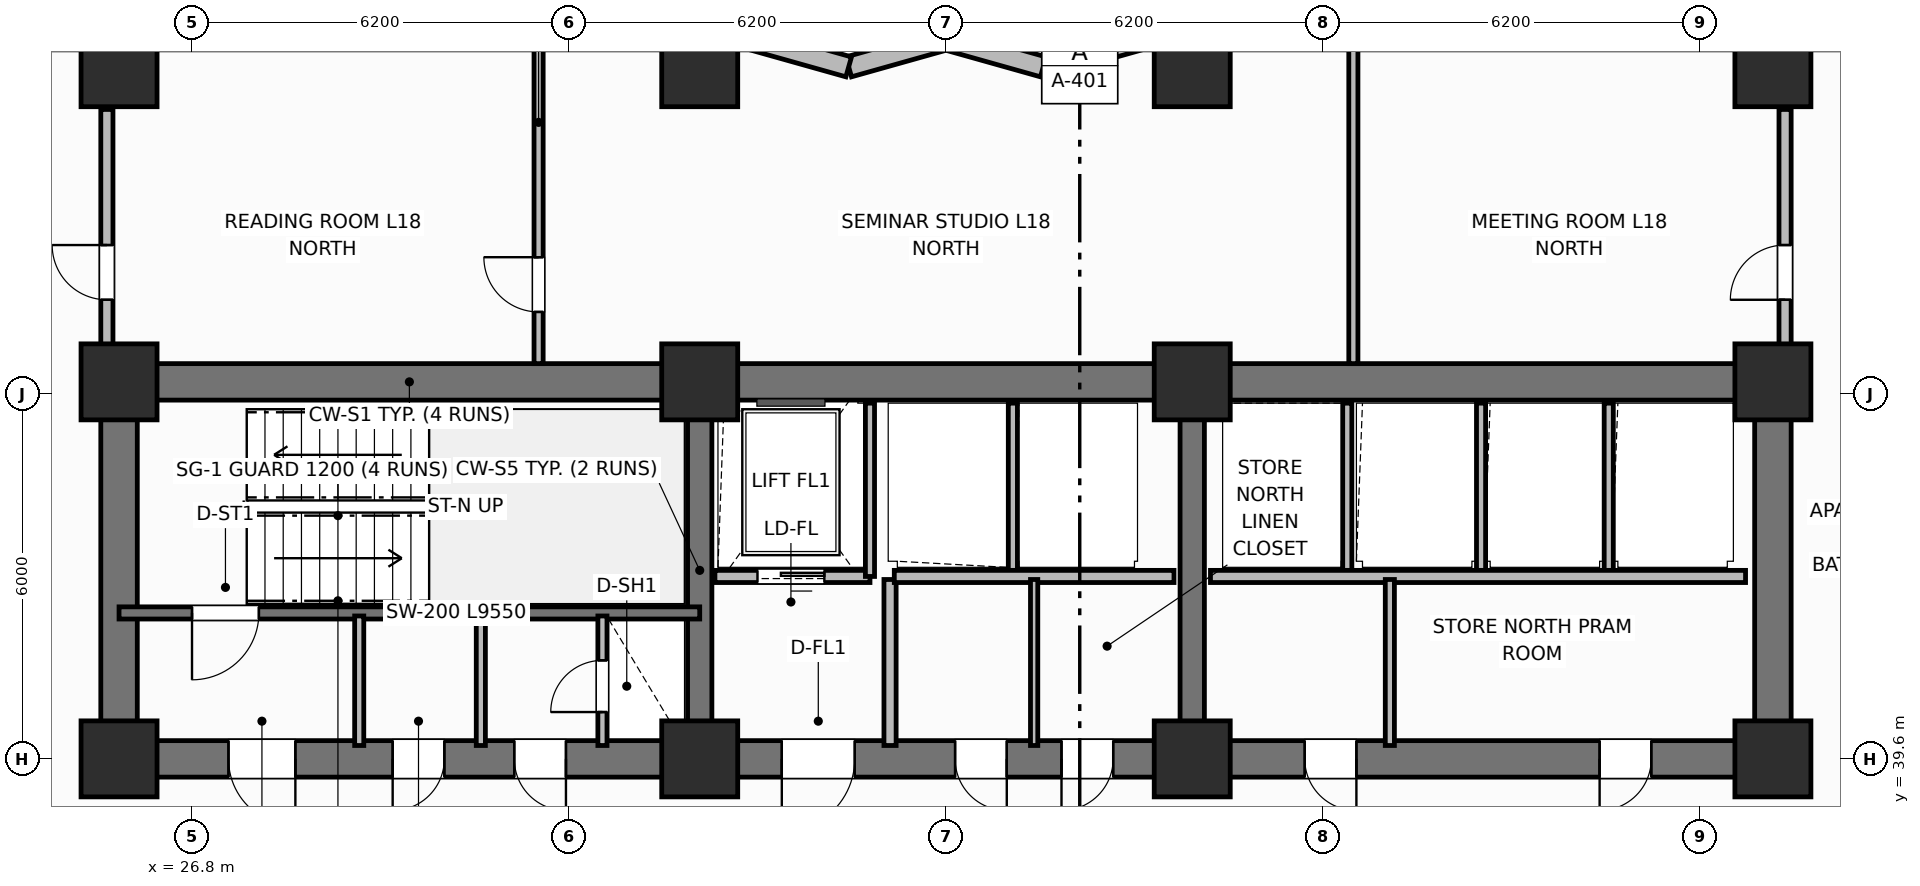
"""IFC4 building model, lengths in metres.
Left out: names, types, materials, properties, quantities, classifications, styles, units other than length and angle.
Written with IfcOpenShell. Run it as: python <this file> out.ifc"""

import sys

from ifc_helpers import new_model, si_unit, direction, frame, frame_2d, origin, origin_2d, place, context, subcontext, project, spatial, rectangle, extrude, element, fill, save


model = new_model("IFC4")
c1 = context("Model", 3, precision=1e-05, world=origin(), true_north=direction((0.0, 1.0)))
c2 = subcontext(c1, "Body", "Model", "MODEL_VIEW")
j1 = project(units=[si_unit("LENGTHUNIT", "METRE"), si_unit("PLANEANGLEUNIT", "RADIAN")], contexts=[c1])
p1 = place(None, origin())
s1 = spatial("IfcSite", under=j1, at=p1, CompositionType="ELEMENT")
p2 = place(p1, origin())
s2 = spatial("IfcBuilding", under=s1, at=p2, CompositionType="ELEMENT")
p3 = place(p2, frame((0.0, 0.0, 73.2)))
s3 = spatial("IfcBuildingStorey", under=s2, at=p3, CompositionType="ELEMENT", Elevation=73.2)
p4 = place(p3, frame((25.6, 45.8, 0.0), z_axis=(0.0, 0.0, 1.0), x_axis=(1.0, 0.0, 0.0)))
e1 = element("IfcWall", 1, at=p4, inside=s3, PredefinedType="SHEAR", context=c2, shape_type="SweptSolid", body=[
    extrude(rectangle(XDim=27.2, YDim=0.6, at=frame_2d((13.6, 0.0))), origin(), (0.0, 0.0, 1.0), 3.7),
])
for number, where, z_axis, x_axis in (
    (2, (25.6, 39.9, 0.0), (0.0, 0.0, 1.0), (0.0, 1.0, 0.0)),
    (3, (52.8, 39.9, 0.0), (0.0, 0.0, 1.0), (0.0, 1.0, 0.0)),
):
    element("IfcWall", number, at=place(p3, frame(where, z_axis=z_axis, x_axis=x_axis)), inside=s3, PredefinedType="SHEAR", context=c2, shape_type="SweptSolid", body=[
        extrude(rectangle(XDim=5.6, YDim=0.6, at=frame_2d((2.8, 0.0))), origin(), (0.0, 0.0, 1.0), 3.7),
    ])
p5 = place(p3, frame((52.8, 39.6, 0.0), z_axis=(0.0, 0.0, 1.0), x_axis=(-1.0, 0.0, 0.0)))
e4 = element("IfcWall", 4, at=p5, inside=s3, PredefinedType="SHEAR", context=c2, shape_type="SweptSolid", body=[
    extrude(rectangle(XDim=27.2, YDim=0.6, at=frame_2d((13.6, 0.0))), origin(), (0.0, 0.0, 1.0), 3.7),
])
p6 = place(p5, frame((24.3, 0.0, 0.0)))
e5 = element("IfcOpeningElement", 5, at=p6, cuts=e4, PredefinedType="OPENING", context=c2, shape_type="SweptSolid", body=[
    extrude(rectangle(XDim=1.1, YDim=2.15, at=frame_2d((0.55, 1.075))), frame((0.0, 0.31, 0.0), z_axis=(0.0, -1.0, 0.0), x_axis=(1.0, 0.0, 0.0)), (0.0, 0.0, 1.0), 0.62),
])
p7 = place(p5, frame((21.85, 0.0, 0.0)))
e6 = element("IfcOpeningElement", 6, at=p7, cuts=e4, PredefinedType="OPENING", context=c2, shape_type="SweptSolid", body=[
    extrude(rectangle(XDim=0.85, YDim=2.1, at=frame_2d((0.425, 1.05))), frame((0.0, 0.31, 0.0), z_axis=(0.0, -1.0, 0.0), x_axis=(1.0, 0.0, 0.0)), (0.0, 0.0, 1.0), 0.62),
])
p8 = place(p5, frame((19.85, 0.0, 0.0)))
e7 = element("IfcOpeningElement", 7, at=p8, cuts=e4, PredefinedType="OPENING", context=c2, shape_type="SweptSolid", body=[
    extrude(rectangle(XDim=0.85, YDim=2.1, at=frame_2d((0.425, 1.05))), frame((0.0, 0.31, 0.0), z_axis=(0.0, -1.0, 0.0), x_axis=(1.0, 0.0, 0.0)), (0.0, 0.0, 1.0), 0.62),
])
p9 = place(p5, frame((15.1, 0.0, 0.0)))
e8 = element("IfcOpeningElement", 8, at=p9, cuts=e4, PredefinedType="OPENING", context=c2, shape_type="SweptSolid", body=[
    extrude(rectangle(XDim=1.2, YDim=2.15, at=frame_2d((0.6, 1.075))), frame((0.0, 0.31, 0.0), z_axis=(0.0, -1.0, 0.0), x_axis=(1.0, 0.0, 0.0)), (0.0, 0.0, 1.0), 0.62),
])
p10 = place(p5, frame((12.6, 0.0, 0.0)))
e9 = element("IfcOpeningElement", 9, at=p10, cuts=e4, PredefinedType="OPENING", context=c2, shape_type="SweptSolid", body=[
    extrude(rectangle(XDim=0.85, YDim=2.1, at=frame_2d((0.425, 1.05))), frame((0.0, 0.31, 0.0), z_axis=(0.0, -1.0, 0.0), x_axis=(1.0, 0.0, 0.0)), (0.0, 0.0, 1.0), 0.62),
])
p11 = place(p5, frame((10.85, 0.0, 0.0)))
e10 = element("IfcOpeningElement", 10, at=p11, cuts=e4, PredefinedType="OPENING", context=c2, shape_type="SweptSolid", body=[
    extrude(rectangle(XDim=0.85, YDim=2.1, at=frame_2d((0.425, 1.05))), frame((0.0, 0.31, 0.0), z_axis=(0.0, -1.0, 0.0), x_axis=(1.0, 0.0, 0.0)), (0.0, 0.0, 1.0), 0.62),
])
p12 = place(p5, frame((6.85, 0.0, 0.0)))
e11 = element("IfcOpeningElement", 11, at=p12, cuts=e4, PredefinedType="OPENING", context=c2, shape_type="SweptSolid", body=[
    extrude(rectangle(XDim=0.85, YDim=2.1, at=frame_2d((0.425, 1.05))), frame((0.0, 0.31, 0.0), z_axis=(0.0, -1.0, 0.0), x_axis=(1.0, 0.0, 0.0)), (0.0, 0.0, 1.0), 0.62),
])
p13 = place(p5, frame((2.0, 0.0, 0.0)))
e12 = element("IfcOpeningElement", 12, at=p13, cuts=e4, PredefinedType="OPENING", context=c2, shape_type="SweptSolid", body=[
    extrude(rectangle(XDim=0.85, YDim=2.1, at=frame_2d((0.425, 1.05))), frame((0.0, 0.31, 0.0), z_axis=(0.0, -1.0, 0.0), x_axis=(1.0, 0.0, 0.0)), (0.0, 0.0, 1.0), 0.62),
])
for number, where, z_axis, x_axis in (
    (13, (35.15, 39.9, 0.0), (0.0, 0.0, 1.0), (0.0, 1.0, 0.0)),
    (14, (43.25, 39.9, 0.0), (0.0, 0.0, 1.0), (0.0, 1.0, 0.0)),
):
    element("IfcWall", number, at=place(p3, frame(where, z_axis=z_axis, x_axis=x_axis)), inside=s3, PredefinedType="SHEAR", context=c2, shape_type="SweptSolid", body=[
        extrude(rectangle(XDim=5.6, YDim=0.4, at=frame_2d((2.8, 0.0))), origin(), (0.0, 0.0, 1.0), 3.7),
    ])
for number, where, z_axis, x_axis in (
    (15, (25.6, 39.6, 0.0), (0.0, 0.0, 1.0), (1.0, 0.0, 0.0)),
    (16, (25.6, 45.8, 0.0), (0.0, 0.0, 1.0), (1.0, 0.0, 0.0)),
    (17, (35.15, 39.6, 0.0), (0.0, 0.0, 1.0), (1.0, 0.0, 0.0)),
    (18, (35.15, 45.8, 0.0), (0.0, 0.0, 1.0), (1.0, 0.0, 0.0)),
    (19, (43.25, 39.6, 0.0), (0.0, 0.0, 1.0), (1.0, 0.0, 0.0)),
    (20, (43.25, 45.8, 0.0), (0.0, 0.0, 1.0), (1.0, 0.0, 0.0)),
    (21, (52.8, 39.6, 0.0), (0.0, 0.0, 1.0), (1.0, 0.0, 0.0)),
    (22, (52.8, 45.8, 0.0), (0.0, 0.0, 1.0), (1.0, 0.0, 0.0)),
    (23, (25.6, 50.95, 0.0), (0.0, 0.0, 1.0), (1.0, 0.0, 0.0)),
    (24, (35.15, 50.95, 0.0), (0.0, 0.0, 1.0), (1.0, 0.0, 0.0)),
    (25, (43.25, 50.95, 0.0), (0.0, 0.0, 1.0), (1.0, 0.0, 0.0)),
    (26, (52.8, 50.95, 0.0), (0.0, 0.0, 1.0), (1.0, 0.0, 0.0)),
):
    element("IfcColumn", number, at=place(p3, frame(where, z_axis=z_axis, x_axis=x_axis)), inside=s3, PredefinedType="COLUMN", context=c2, shape_type="SweptSolid", body=[
        extrude(rectangle(XDim=1.25, YDim=1.25, at=origin_2d()), origin(), (0.0, 0.0, 1.0), 3.7),
    ])
p14 = place(p3, frame((42.4, 51.43, 0.0), z_axis=(0.0, 0.0, 1.0), x_axis=(-0.962652136636, -0.270741322725, 0.0)))
e27 = element("IfcWall", 27, at=p14, inside=s3, PredefinedType="SOLIDWALL", context=c2, shape_type="SweptSolid", body=[
    extrude(rectangle(XDim=1.662, YDim=0.34, at=frame_2d((0.831, 0.0))), origin(), (0.0, 0.0, 1.0), 2.66),
])
p15 = place(p3, frame((40.8, 50.98, 0.0), z_axis=(0.0, 0.0, 1.0), x_axis=(-0.962662902433, 0.270703040766, 0.0)))
e28 = element("IfcWall", 28, at=p15, inside=s3, PredefinedType="SOLIDWALL", context=c2, shape_type="SweptSolid", body=[
    extrude(rectangle(XDim=1.662, YDim=0.34, at=frame_2d((0.831, 0.0))), origin(), (0.0, 0.0, 1.0), 2.66),
])
p16 = place(p3, frame((39.2, 51.43, 0.0), z_axis=(0.0, 0.0, 1.0), x_axis=(-0.962652136636, -0.270741322725, 0.0)))
e29 = element("IfcWall", 29, at=p16, inside=s3, PredefinedType="SOLIDWALL", context=c2, shape_type="SweptSolid", body=[
    extrude(rectangle(XDim=1.662, YDim=0.34, at=frame_2d((0.831, 0.0))), origin(), (0.0, 0.0, 1.0), 2.66),
])
p17 = place(p3, frame((37.6, 50.98, 0.0), z_axis=(0.0, 0.0, 1.0), x_axis=(-0.962662902433, 0.270703040766, 0.0)))
e30 = element("IfcWall", 30, at=p17, inside=s3, PredefinedType="SOLIDWALL", context=c2, shape_type="SweptSolid", body=[
    extrude(rectangle(XDim=1.662, YDim=0.34, at=frame_2d((0.831, 0.0))), origin(), (0.0, 0.0, 1.0), 2.66),
])
p18 = place(p3, frame((35.15, 42.0, 0.0), z_axis=(0.0, 0.0, 1.0), x_axis=(-1.0, 0.0, 0.0)))
e31 = element("IfcWall", 31, at=p18, inside=s3, PredefinedType="SHEAR", context=c2, shape_type="SweptSolid", body=[
    extrude(rectangle(XDim=9.55, YDim=0.2, at=frame_2d((4.775, 0.0))), origin(), (0.0, 0.0, 1.0), 3.7),
])
p19 = place(p18, frame((7.25, 0.0, 0.0)))
e32 = element("IfcOpeningElement", 32, at=p19, cuts=e31, PredefinedType="OPENING", context=c2, shape_type="SweptSolid", body=[
    extrude(rectangle(XDim=1.1, YDim=2.15, at=frame_2d((0.55, 1.075))), frame((0.0, 0.11, 0.0), z_axis=(0.0, -1.0, 0.0), x_axis=(1.0, 0.0, 0.0)), (0.0, 0.0, 1.0), 0.22),
])
p20 = place(p3, frame((33.55, 39.82, 0.0), z_axis=(0.0, 0.0, 1.0), x_axis=(0.0, 1.0, 0.0)))
e33 = element("IfcWall", 33, at=p20, inside=s3, PredefinedType="PARTITIONING", context=c2, shape_type="SweptSolid", body=[
    extrude(rectangle(XDim=2.13, YDim=0.15, at=frame_2d((1.065, 0.0))), origin(), (0.0, 0.0, 1.0), 2.49),
])
p21 = place(p20, frame((0.55, 0.0, 0.0)))
e34 = element("IfcOpeningElement", 34, at=p21, cuts=e33, PredefinedType="OPENING", context=c2, shape_type="SweptSolid", body=[
    extrude(rectangle(XDim=0.85, YDim=2.05, at=frame_2d((0.425, 1.025))), frame((0.0, 0.085, 0.0), z_axis=(0.0, -1.0, 0.0), x_axis=(1.0, 0.0, 0.0)), (0.0, 0.0, 1.0), 0.17),
])
for number, where, z_axis, x_axis in (
    (35, (29.55, 39.82, 0.0), (0.0, 0.0, 1.0), (0.0, 1.0, 0.0)),
    (36, (31.55, 39.82, 0.0), (0.0, 0.0, 1.0), (0.0, 1.0, 0.0)),
):
    element("IfcWall", number, at=place(p3, frame(where, z_axis=z_axis, x_axis=x_axis)), inside=s3, PredefinedType="PARTITIONING", context=c2, shape_type="SweptSolid", body=[
        extrude(rectangle(XDim=2.13, YDim=0.15, at=frame_2d((1.065, 0.0))), origin(), (0.0, 0.0, 1.0), 2.49),
    ])
p22 = place(p3, frame((37.95, 42.6, 0.0), z_axis=(0.0, 0.0, 1.0), x_axis=(-1.0, 0.0, 0.0)))
e37 = element("IfcWall", 37, at=p22, inside=s3, PredefinedType="PARTITIONING", context=c2, shape_type="SweptSolid", body=[
    extrude(rectangle(XDim=2.55, YDim=0.2, at=frame_2d((1.275, 0.0))), origin(), (0.0, 0.0, 1.0), 2.26),
])
p23 = place(p22, frame((0.75, 0.0, 0.0)))
e38 = element("IfcOpeningElement", 38, at=p23, cuts=e37, PredefinedType="OPENING", context=c2, shape_type="SweptSolid", body=[
    extrude(rectangle(XDim=1.1, YDim=2.15, at=frame_2d((0.55, 1.075))), frame((0.0, 0.11, 0.0), z_axis=(0.0, -1.0, 0.0), x_axis=(1.0, 0.0, 0.0)), (0.0, 0.0, 1.0), 0.22),
])
p24 = place(p3, frame((37.95, 42.6, 0.0), z_axis=(0.0, 0.0, 1.0), x_axis=(0.0, 1.0, 0.0)))
e39 = element("IfcWall", 39, at=p24, inside=s3, PredefinedType="PARTITIONING", context=c2, shape_type="SweptSolid", body=[
    extrude(rectangle(XDim=2.85, YDim=0.15, at=frame_2d((1.425, 0.0))), origin(), (0.0, 0.0, 1.0), 2.49),
])
p25 = place(p3, frame((38.28, 39.82, 0.0), z_axis=(0.0, 0.0, 1.0), x_axis=(0.0, 1.0, 0.0)))
e40 = element("IfcWall", 40, at=p25, inside=s3, PredefinedType="PARTITIONING", context=c2, shape_type="SweptSolid", body=[
    extrude(rectangle(XDim=2.73, YDim=0.2, at=frame_2d((1.365, 0.0))), origin(), (0.0, 0.0, 1.0), 2.49),
])
p26 = place(p3, frame((40.3, 42.65, 0.0), z_axis=(0.0, 0.0, 1.0), x_axis=(0.0, 1.0, 0.0)))
e41 = element("IfcWall", 41, at=p26, inside=s3, PredefinedType="PARTITIONING", context=c2, shape_type="SweptSolid", body=[
    extrude(rectangle(XDim=2.8, YDim=0.15, at=frame_2d((1.4, 0.0))), origin(), (0.0, 0.0, 1.0), 2.49),
])
p27 = place(p3, frame((42.95, 42.6, 0.0), z_axis=(0.0, 0.0, 1.0), x_axis=(-1.0, 0.0, 0.0)))
e42 = element("IfcWall", 42, at=p27, inside=s3, PredefinedType="PARTITIONING", context=c2, shape_type="SweptSolid", body=[
    extrude(rectangle(XDim=4.6, YDim=0.2, at=frame_2d((2.3, 0.0))), origin(), (0.0, 0.0, 1.0), 2.26),
])
p28 = place(p3, frame((40.65, 39.82, 0.0), z_axis=(0.0, 0.0, 1.0), x_axis=(0.0, 1.0, 0.0)))
e43 = element("IfcWall", 43, at=p28, inside=s3, PredefinedType="PARTITIONING", context=c2, shape_type="SweptSolid", body=[
    extrude(rectangle(XDim=2.73, YDim=0.12, at=frame_2d((1.365, 0.0))), origin(), (0.0, 0.0, 1.0), 2.49),
])
for number, where, z_axis, x_axis in (
    (44, (45.8, 42.65, 0.0), (0.0, 0.0, 1.0), (0.0, 1.0, 0.0)),
    (45, (48.0, 42.65, 0.0), (0.0, 0.0, 1.0), (0.0, 1.0, 0.0)),
    (46, (50.1, 42.65, 0.0), (0.0, 0.0, 1.0), (0.0, 1.0, 0.0)),
):
    element("IfcWall", number, at=place(p3, frame(where, z_axis=z_axis, x_axis=x_axis)), inside=s3, PredefinedType="PARTITIONING", context=c2, shape_type="SweptSolid", body=[
        extrude(rectangle(XDim=2.8, YDim=0.15, at=frame_2d((1.4, 0.0))), origin(), (0.0, 0.0, 1.0), 2.49),
    ])
p29 = place(p3, frame((52.35, 42.6, 0.0), z_axis=(0.0, 0.0, 1.0), x_axis=(-1.0, 0.0, 0.0)))
e47 = element("IfcWall", 47, at=p29, inside=s3, PredefinedType="PARTITIONING", context=c2, shape_type="SweptSolid", body=[
    extrude(rectangle(XDim=8.8, YDim=0.2, at=frame_2d((4.4, 0.0))), origin(), (0.0, 0.0, 1.0), 2.49),
])
p30 = place(p3, frame((46.5, 39.82, 0.0), z_axis=(0.0, 0.0, 1.0), x_axis=(0.0, 1.0, 0.0)))
e48 = element("IfcWall", 48, at=p30, inside=s3, PredefinedType="PARTITIONING", context=c2, shape_type="SweptSolid", body=[
    extrude(rectangle(XDim=2.73, YDim=0.15, at=frame_2d((1.365, 0.0))), origin(), (0.0, 0.0, 1.0), 2.49),
])
p31 = place(p3, frame((32.5, 46.1, 0.0), z_axis=(0.0, 0.0, 1.0), x_axis=(0.0, 1.0, 0.0)))
e49 = element("IfcWall", 49, at=p31, inside=s3, PredefinedType="PARTITIONING", context=c2, shape_type="SweptSolid", body=[
    extrude(rectangle(XDim=5.33, YDim=0.15, at=frame_2d((2.665, 0.0))), origin(), (0.0, 0.0, 1.0), 2.49),
])
p32 = place(p31, frame((0.85, 0.0, 0.0)))
e50 = element("IfcOpeningElement", 50, at=p32, cuts=e49, PredefinedType="OPENING", context=c2, shape_type="SweptSolid", body=[
    extrude(rectangle(XDim=0.9, YDim=2.1, at=frame_2d((0.45, 1.05))), frame((0.0, 0.085, 0.0), z_axis=(0.0, -1.0, 0.0), x_axis=(1.0, 0.0, 0.0)), (0.0, 0.0, 1.0), 0.17),
])
p33 = place(p3, frame((45.9, 46.1, 0.0), z_axis=(0.0, 0.0, 1.0), x_axis=(0.0, 1.0, 0.0)))
e51 = element("IfcWall", 51, at=p33, inside=s3, PredefinedType="PARTITIONING", context=c2, shape_type="SweptSolid", body=[
    extrude(rectangle(XDim=5.33, YDim=0.15, at=frame_2d((2.665, 0.0))), origin(), (0.0, 0.0, 1.0), 2.49),
])
p34 = place(p3, frame((25.4, 46.1, 0.0), z_axis=(0.0, 0.0, 1.0), x_axis=(0.0, 1.0, 0.0)))
e52 = element("IfcWall", 52, at=p34, inside=s3, PredefinedType="PARTITIONING", context=c2, shape_type="SweptSolid", body=[
    extrude(rectangle(XDim=4.18, YDim=0.2, at=frame_2d((2.09, 0.0))), origin(), (0.0, 0.0, 1.0), 2.49),
])
p35 = place(p34, frame((1.05, 0.0, 0.0)))
e53 = element("IfcOpeningElement", 53, at=p35, cuts=e52, PredefinedType="OPENING", context=c2, shape_type="SweptSolid", body=[
    extrude(rectangle(XDim=0.9, YDim=2.1, at=frame_2d((0.45, 1.05))), frame((0.0, 0.11, 0.0), z_axis=(0.0, -1.0, 0.0), x_axis=(1.0, 0.0, 0.0)), (0.0, 0.0, 1.0), 0.22),
])
p36 = place(p3, frame((53.0, 46.1, 0.0), z_axis=(0.0, 0.0, 1.0), x_axis=(0.0, 1.0, 0.0)))
e54 = element("IfcWall", 54, at=p36, inside=s3, PredefinedType="PARTITIONING", context=c2, shape_type="SweptSolid", body=[
    extrude(rectangle(XDim=4.18, YDim=0.2, at=frame_2d((2.09, 0.0))), origin(), (0.0, 0.0, 1.0), 2.49),
])
p37 = place(p36, frame((1.05, 0.0, 0.0)))
e55 = element("IfcOpeningElement", 55, at=p37, cuts=e54, PredefinedType="OPENING", context=c2, shape_type="SweptSolid", body=[
    extrude(rectangle(XDim=0.9, YDim=2.1, at=frame_2d((0.45, 1.05))), frame((0.0, 0.11, 0.0), z_axis=(0.0, -1.0, 0.0), x_axis=(1.0, 0.0, 0.0)), (0.0, 0.0, 1.0), 0.22),
])
p38 = place(p19, origin())
e56 = element("IfcDoor", 56, at=p38, inside=s3, OperationType="SINGLE_SWING_RIGHT", PredefinedType="DOOR", context=c2, shape_type="SweptSolid", body=[
    extrude(rectangle(XDim=1.1, YDim=2.15, at=frame_2d((0.55, 1.075))), frame((0.0, 0.025, 0.0), z_axis=(0.0, -1.0, 0.0), x_axis=(1.0, 0.0, 0.0)), (0.0, 0.0, 1.0), 0.05),
])
fill(e32, e56)
p39 = place(p21, origin())
e57 = element("IfcDoor", 57, at=p39, inside=s3, OperationType="SINGLE_SWING_LEFT", PredefinedType="TRAPDOOR", context=c2, shape_type="SweptSolid", body=[
    extrude(rectangle(XDim=0.85, YDim=2.05, at=frame_2d((0.425, 1.025))), frame((0.0, 0.025, 0.0), z_axis=(0.0, -1.0, 0.0), x_axis=(1.0, 0.0, 0.0)), (0.0, 0.0, 1.0), 0.05),
])
fill(e34, e57)
p40 = place(p23, origin())
e58 = element("IfcDoor", 58, at=p40, inside=s3, OperationType="SLIDING_TO_LEFT", PredefinedType="DOOR", context=c2, shape_type="SweptSolid", body=[
    extrude(rectangle(XDim=1.1, YDim=2.15, at=frame_2d((0.55, 1.075))), frame((0.0, 0.025, 0.0), z_axis=(0.0, -1.0, 0.0), x_axis=(1.0, 0.0, 0.0)), (0.0, 0.0, 1.0), 0.05),
])
fill(e38, e58)
p41 = place(p32, origin())
e59 = element("IfcDoor", 59, at=p41, inside=s3, OperationType="SINGLE_SWING_RIGHT", PredefinedType="DOOR", context=c2, shape_type="SweptSolid", body=[
    extrude(rectangle(XDim=0.9, YDim=2.1, at=frame_2d((0.45, 1.05))), frame((0.0, 0.025, 0.0), z_axis=(0.0, -1.0, 0.0), x_axis=(1.0, 0.0, 0.0)), (0.0, 0.0, 1.0), 0.05),
])
fill(e50, e59)
p42 = place(p35, origin())
e60 = element("IfcDoor", 60, at=p42, inside=s3, OperationType="SINGLE_SWING_RIGHT", PredefinedType="DOOR", context=c2, shape_type="SweptSolid", body=[
    extrude(rectangle(XDim=0.9, YDim=2.1, at=frame_2d((0.45, 1.05))), frame((0.0, 0.025, 0.0), z_axis=(0.0, -1.0, 0.0), x_axis=(1.0, 0.0, 0.0)), (0.0, 0.0, 1.0), 0.05),
])
fill(e53, e60)
p43 = place(p37, origin())
e61 = element("IfcDoor", 61, at=p43, inside=s3, OperationType="SINGLE_SWING_LEFT", PredefinedType="DOOR", context=c2, shape_type="SweptSolid", body=[
    extrude(rectangle(XDim=0.9, YDim=2.1, at=frame_2d((0.45, 1.05))), frame((0.0, 0.025, 0.0), z_axis=(0.0, -1.0, 0.0), x_axis=(1.0, 0.0, 0.0)), (0.0, 0.0, 1.0), 0.05),
])
fill(e55, e61)
p44 = place(p6, origin())
e62 = element("IfcDoor", 62, at=p44, inside=s3, OperationType="SINGLE_SWING_LEFT", PredefinedType="DOOR", context=c2, shape_type="SweptSolid", body=[
    extrude(rectangle(XDim=1.1, YDim=2.15, at=frame_2d((0.55, 1.075))), frame((0.0, 0.025, 0.0), z_axis=(0.0, -1.0, 0.0), x_axis=(1.0, 0.0, 0.0)), (0.0, 0.0, 1.0), 0.05),
])
fill(e5, e62)
p45 = place(p7, origin())
e63 = element("IfcDoor", 63, at=p45, inside=s3, OperationType="SINGLE_SWING_RIGHT", PredefinedType="DOOR", context=c2, shape_type="SweptSolid", body=[
    extrude(rectangle(XDim=0.85, YDim=2.1, at=frame_2d((0.425, 1.05))), frame((0.0, 0.025, 0.0), z_axis=(0.0, -1.0, 0.0), x_axis=(1.0, 0.0, 0.0)), (0.0, 0.0, 1.0), 0.05),
])
fill(e6, e63)
p46 = place(p8, origin())
e64 = element("IfcDoor", 64, at=p46, inside=s3, OperationType="SINGLE_SWING_LEFT", PredefinedType="DOOR", context=c2, shape_type="SweptSolid", body=[
    extrude(rectangle(XDim=0.85, YDim=2.1, at=frame_2d((0.425, 1.05))), frame((0.0, 0.025, 0.0), z_axis=(0.0, -1.0, 0.0), x_axis=(1.0, 0.0, 0.0)), (0.0, 0.0, 1.0), 0.05),
])
fill(e7, e64)
p47 = place(p9, origin())
e65 = element("IfcDoor", 65, at=p47, inside=s3, OperationType="SINGLE_SWING_RIGHT", PredefinedType="DOOR", context=c2, shape_type="SweptSolid", body=[
    extrude(rectangle(XDim=1.2, YDim=2.15, at=frame_2d((0.6, 1.075))), frame((0.0, 0.025, 0.0), z_axis=(0.0, -1.0, 0.0), x_axis=(1.0, 0.0, 0.0)), (0.0, 0.0, 1.0), 0.05),
])
fill(e8, e65)
p48 = place(p10, origin())
e66 = element("IfcDoor", 66, at=p48, inside=s3, OperationType="SINGLE_SWING_LEFT", PredefinedType="DOOR", context=c2, shape_type="SweptSolid", body=[
    extrude(rectangle(XDim=0.85, YDim=2.1, at=frame_2d((0.425, 1.05))), frame((0.0, 0.025, 0.0), z_axis=(0.0, -1.0, 0.0), x_axis=(1.0, 0.0, 0.0)), (0.0, 0.0, 1.0), 0.05),
])
fill(e9, e66)
p49 = place(p11, origin())
e67 = element("IfcDoor", 67, at=p49, inside=s3, OperationType="SINGLE_SWING_RIGHT", PredefinedType="DOOR", context=c2, shape_type="SweptSolid", body=[
    extrude(rectangle(XDim=0.85, YDim=2.1, at=frame_2d((0.425, 1.05))), frame((0.0, 0.025, 0.0), z_axis=(0.0, -1.0, 0.0), x_axis=(1.0, 0.0, 0.0)), (0.0, 0.0, 1.0), 0.05),
])
fill(e10, e67)
p50 = place(p12, origin())
e68 = element("IfcDoor", 68, at=p50, inside=s3, OperationType="SINGLE_SWING_LEFT", PredefinedType="DOOR", context=c2, shape_type="SweptSolid", body=[
    extrude(rectangle(XDim=0.85, YDim=2.1, at=frame_2d((0.425, 1.05))), frame((0.0, 0.025, 0.0), z_axis=(0.0, -1.0, 0.0), x_axis=(1.0, 0.0, 0.0)), (0.0, 0.0, 1.0), 0.05),
])
fill(e11, e68)
p51 = place(p13, origin())
e69 = element("IfcDoor", 69, at=p51, inside=s3, OperationType="SINGLE_SWING_RIGHT", PredefinedType="DOOR", context=c2, shape_type="SweptSolid", body=[
    extrude(rectangle(XDim=0.85, YDim=2.1, at=frame_2d((0.425, 1.05))), frame((0.0, 0.025, 0.0), z_axis=(0.0, -1.0, 0.0), x_axis=(1.0, 0.0, 0.0)), (0.0, 0.0, 1.0), 0.05),
])
fill(e12, e69)
save(model, sys.argv[1])
